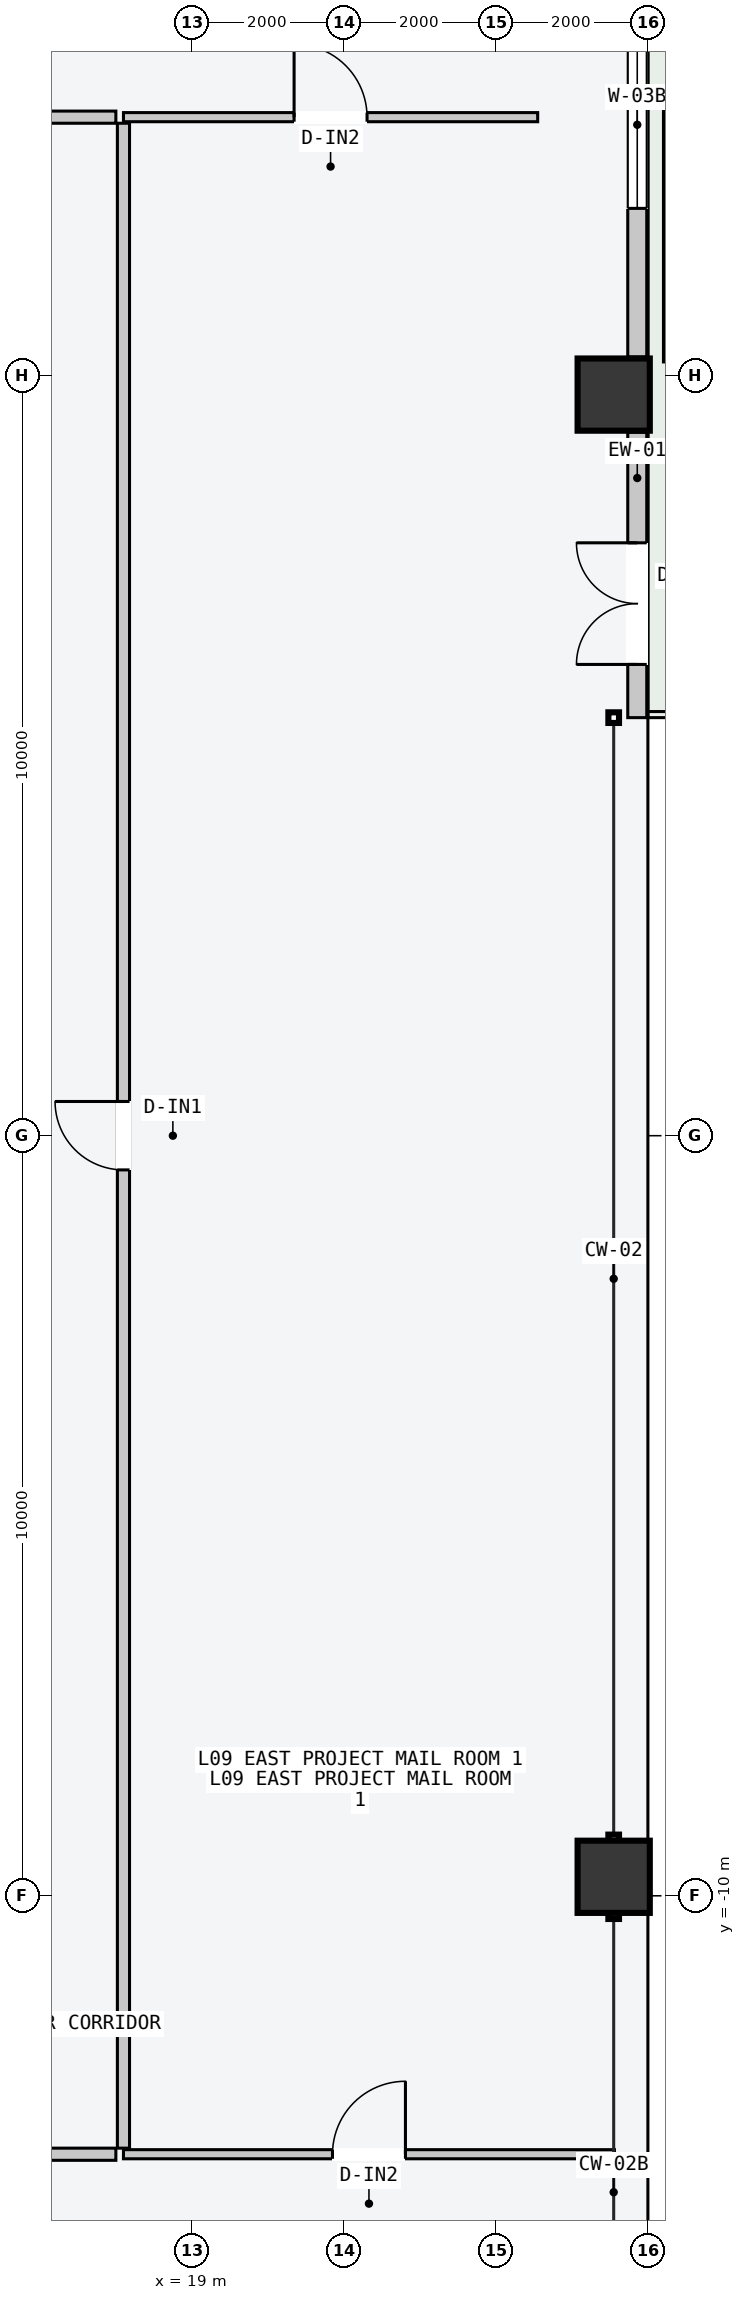
"""IFC4 building model, lengths in metres.
Left out: names, types, materials, properties, quantities, classifications, styles, units other than length and angle.
Written with IfcOpenShell. Run it as: python <this file> out.ifc"""

import sys

from ifc_helpers import new_model, si_unit, direction, frame, frame_2d, origin, origin_2d, place, context, subcontext, project, spatial, rectangle, hollow_rectangle, extrude, element, fill, save


model = new_model("IFC4")
c1 = context("Model", 3, precision=1e-05, world=origin(), true_north=direction((0.0, 1.0)))
c2 = subcontext(c1, "Body", "Model", "MODEL_VIEW")
j1 = project(units=[si_unit("LENGTHUNIT", "METRE"), si_unit("PLANEANGLEUNIT", "RADIAN")], contexts=[c1])
p1 = place(None, origin())
s1 = spatial("IfcSite", under=j1, at=p1, CompositionType="ELEMENT")
p2 = place(p1, origin())
s2 = spatial("IfcBuilding", under=s1, at=p2, CompositionType="ELEMENT")
p3 = place(p2, frame((0.0, 0.0, 38.4)))
s3 = spatial("IfcBuildingStorey", under=s2, at=p3, CompositionType="ELEMENT", Elevation=38.4)
for number, where, z_axis, x_axis in (
    (1, (24.55, -9.75, 0.0), (0.0, 0.0, 1.0), (0.0, 1.0, 0.0)),
    (2, (24.55, 9.75, 0.0), (0.0, 0.0, 1.0), (0.0, 1.0, 0.0)),
):
    element("IfcColumn", number, at=place(p3, frame(where, z_axis=z_axis, x_axis=x_axis)), inside=s3, PredefinedType="COLUMN", context=c2, shape_type="SweptSolid", body=[
        extrude(hollow_rectangle(XDim=0.95, YDim=0.95, WallThickness=0.048, at=origin_2d()), origin(), (0.0, 0.0, 1.0), 3.6),
    ])
p4 = place(p3, frame((24.86, 5.5, 0.0), z_axis=(0.0, 0.0, 1.0), x_axis=(0.0, 1.0, 0.0)))
e3 = element("IfcWall", 3, at=p4, inside=s3, PredefinedType="STANDARD", context=c2, shape_type="SweptSolid", body=[
    extrude(rectangle(XDim=3.755, YDim=0.25, at=frame_2d((1.877, 0.0))), origin(), (0.0, 0.0, 1.0), 3.4),
])
p5 = place(p4, frame((0.7, 0.0, 0.0)))
e4 = element("IfcOpeningElement", 4, at=p5, cuts=e3, PredefinedType="OPENING", context=c2, shape_type="SweptSolid", body=[
    extrude(rectangle(XDim=1.6, YDim=2.2, at=frame_2d((0.8, 1.1))), frame((0.0, 0.135, 0.0), z_axis=(0.0, -1.0, 0.0), x_axis=(1.0, 0.0, 0.0)), (0.0, 0.0, 1.0), 0.27),
])
p6 = place(p3, frame((24.86, 10.245, 0.0), z_axis=(0.0, 0.0, 1.0), x_axis=(0.0, 1.0, 0.0)))
e5 = element("IfcWall", 5, at=p6, inside=s3, PredefinedType="STANDARD", context=c2, shape_type="SweptSolid", body=[
    extrude(rectangle(XDim=7.31, YDim=0.25, at=frame_2d((3.655, 0.0))), origin(), (0.0, 0.0, 1.0), 3.4),
])
p7 = place(p6, frame((1.955, 0.0, 0.85)))
e6 = element("IfcOpeningElement", 6, at=p7, cuts=e5, PredefinedType="OPENING", context=c2, shape_type="SweptSolid", body=[
    extrude(rectangle(XDim=2.2, YDim=2.1, at=frame_2d((1.1, 1.05))), frame((0.0, 0.135, 0.0), z_axis=(0.0, -1.0, 0.0), x_axis=(1.0, 0.0, 0.0)), (0.0, 0.0, 1.0), 0.27),
])
p8 = place(p3, frame((-18.0, 13.4, 0.0), z_axis=(0.0, 0.0, 1.0), x_axis=(1.0, 0.0, 0.0)))
e7 = element("IfcWall", 7, at=p8, inside=s3, PredefinedType="PARTITIONING", context=c2, shape_type="SweptSolid", body=[
    extrude(rectangle(XDim=36.0, YDim=0.16, at=frame_2d((18.0, 0.0))), origin(), (0.0, 0.0, 1.0), 3.4),
])
p9 = place(p8, frame((7.105, 0.0, 0.0)))
e8 = element("IfcOpeningElement", 8, at=p9, cuts=e7, PredefinedType="OPENING", context=c2, shape_type="SweptSolid", body=[
    extrude(rectangle(XDim=1.4, YDim=2.2, at=frame_2d((0.7, 1.1))), frame((0.0, 0.09, 0.0), z_axis=(0.0, -1.0, 0.0), x_axis=(1.0, 0.0, 0.0)), (0.0, 0.0, 1.0), 0.18),
])
p10 = place(p8, frame((21.333, 0.0, 0.0)))
e9 = element("IfcOpeningElement", 9, at=p10, cuts=e7, PredefinedType="OPENING", context=c2, shape_type="SweptSolid", body=[
    extrude(rectangle(XDim=0.9, YDim=2.15, at=frame_2d((0.45, 1.075))), frame((0.0, 0.09, 0.0), z_axis=(0.0, -1.0, 0.0), x_axis=(1.0, 0.0, 0.0)), (0.0, 0.0, 1.0), 0.18),
])
p11 = place(p8, frame((31.498, 0.0, 0.0)))
e10 = element("IfcOpeningElement", 10, at=p11, cuts=e7, PredefinedType="OPENING", context=c2, shape_type="SweptSolid", body=[
    extrude(rectangle(XDim=0.96, YDim=2.18, at=frame_2d((0.48, 1.09))), frame((0.0, 0.09, 0.0), z_axis=(0.0, -1.0, 0.0), x_axis=(1.0, 0.0, 0.0)), (0.0, 0.0, 1.0), 0.18),
])
p12 = place(p3, frame((18.1, 13.4, 0.0), z_axis=(0.0, 0.0, 1.0), x_axis=(1.0, 0.0, 0.0)))
e11 = element("IfcWall", 11, at=p12, inside=s3, PredefinedType="PARTITIONING", context=c2, shape_type="SweptSolid", body=[
    extrude(rectangle(XDim=5.45, YDim=0.12, at=frame_2d((2.725, 0.0))), origin(), (0.0, 0.0, 1.0), 3.4),
])
p13 = place(p12, frame((2.245, 0.0, 0.0)))
e12 = element("IfcOpeningElement", 12, at=p13, cuts=e11, PredefinedType="OPENING", context=c2, shape_type="SweptSolid", body=[
    extrude(rectangle(XDim=0.96, YDim=2.18, at=frame_2d((0.48, 1.09))), frame((0.0, 0.07, 0.0), z_axis=(0.0, -1.0, 0.0), x_axis=(1.0, 0.0, 0.0)), (0.0, 0.0, 1.0), 0.14),
])
p14 = place(p3, frame((-18.0, -13.4, 0.0), z_axis=(0.0, 0.0, 1.0), x_axis=(1.0, 0.0, 0.0)))
e13 = element("IfcWall", 13, at=p14, inside=s3, PredefinedType="PARTITIONING", context=c2, shape_type="SweptSolid", body=[
    extrude(rectangle(XDim=36.0, YDim=0.16, at=frame_2d((18.0, 0.0))), origin(), (0.0, 0.0, 1.0), 3.4),
])
p15 = place(p14, frame((7.225, 0.0, 0.0)))
e14 = element("IfcOpeningElement", 14, at=p15, cuts=e13, PredefinedType="OPENING", context=c2, shape_type="SweptSolid", body=[
    extrude(rectangle(XDim=1.02, YDim=2.2, at=frame_2d((0.51, 1.1))), frame((0.0, 0.09, 0.0), z_axis=(0.0, -1.0, 0.0), x_axis=(1.0, 0.0, 0.0)), (0.0, 0.0, 1.0), 0.18),
])
p16 = place(p14, frame((25.205, 0.0, 0.0)))
e15 = element("IfcOpeningElement", 15, at=p16, cuts=e13, PredefinedType="OPENING", context=c2, shape_type="SweptSolid", body=[
    extrude(rectangle(XDim=1.06, YDim=2.2, at=frame_2d((0.53, 1.1))), frame((0.0, 0.09, 0.0), z_axis=(0.0, -1.0, 0.0), x_axis=(1.0, 0.0, 0.0)), (0.0, 0.0, 1.0), 0.18),
])
p17 = place(p3, frame((18.1, -13.4, 0.0), z_axis=(0.0, 0.0, 1.0), x_axis=(1.0, 0.0, 0.0)))
e16 = element("IfcWall", 16, at=p17, inside=s3, PredefinedType="PARTITIONING", context=c2, shape_type="SweptSolid", body=[
    extrude(rectangle(XDim=6.46, YDim=0.12, at=frame_2d((3.23, 0.0))), origin(), (0.0, 0.0, 1.0), 3.4),
])
p18 = place(p17, frame((2.75, 0.0, 0.0)))
e17 = element("IfcOpeningElement", 17, at=p18, cuts=e16, PredefinedType="OPENING", context=c2, shape_type="SweptSolid", body=[
    extrude(rectangle(XDim=0.96, YDim=2.18, at=frame_2d((0.48, 1.09))), frame((0.0, 0.07, 0.0), z_axis=(0.0, -1.0, 0.0), x_axis=(1.0, 0.0, 0.0)), (0.0, 0.0, 1.0), 0.14),
])
p19 = place(p3, frame((18.1, -13.32, 0.0), z_axis=(0.0, 0.0, 1.0), x_axis=(0.0, 1.0, 0.0)))
e18 = element("IfcWall", 18, at=p19, inside=s3, PredefinedType="PARTITIONING", context=c2, shape_type="SweptSolid", body=[
    extrude(rectangle(XDim=26.64, YDim=0.16, at=frame_2d((13.32, 0.0))), origin(), (0.0, 0.0, 1.0), 3.4),
])
p20 = place(p19, frame((12.87, 0.0, 0.0)))
e19 = element("IfcOpeningElement", 19, at=p20, cuts=e18, PredefinedType="OPENING", context=c2, shape_type="SweptSolid", body=[
    extrude(rectangle(XDim=0.9, YDim=2.15, at=frame_2d((0.45, 1.075))), frame((0.0, 0.09, 0.0), z_axis=(0.0, -1.0, 0.0), x_axis=(1.0, 0.0, 0.0)), (0.0, 0.0, 1.0), 0.18),
])
p21 = place(p5, origin())
e20 = element("IfcDoor", 20, at=p21, inside=s3, OperationType="DOUBLE_DOOR_SINGLE_SWING", PredefinedType="DOOR", context=c2, shape_type="SweptSolid", body=[
    extrude(rectangle(XDim=1.6, YDim=2.2, at=frame_2d((0.8, 1.1))), frame((0.0, 0.025, 0.0), z_axis=(0.0, -1.0, 0.0), x_axis=(1.0, 0.0, 0.0)), (0.0, 0.0, 1.0), 0.05),
])
fill(e4, e20)
p22 = place(p7, origin())
e21 = element("IfcWindow", 21, at=p22, inside=s3, PartitioningType="SINGLE_PANEL", PredefinedType="WINDOW", context=c2, shape_type="SweptSolid", body=[
    extrude(rectangle(XDim=2.2, YDim=2.1, at=frame_2d((1.1, 1.05))), frame((0.0, 0.03, 0.0), z_axis=(0.0, -1.0, 0.0), x_axis=(1.0, 0.0, 0.0)), (0.0, 0.0, 1.0), 0.06),
])
fill(e6, e21)
p23 = place(p13, origin())
e22 = element("IfcDoor", 22, at=p23, inside=s3, OperationType="SINGLE_SWING_LEFT", PredefinedType="DOOR", context=c2, shape_type="SweptSolid", body=[
    extrude(rectangle(XDim=0.96, YDim=2.18, at=frame_2d((0.48, 1.09))), frame((0.0, 0.025, 0.0), z_axis=(0.0, -1.0, 0.0), x_axis=(1.0, 0.0, 0.0)), (0.0, 0.0, 1.0), 0.05),
])
fill(e12, e22)
p24 = place(p18, origin())
e23 = element("IfcDoor", 23, at=p24, inside=s3, OperationType="SINGLE_SWING_RIGHT", PredefinedType="DOOR", context=c2, shape_type="SweptSolid", body=[
    extrude(rectangle(XDim=0.96, YDim=2.18, at=frame_2d((0.48, 1.09))), frame((0.0, 0.025, 0.0), z_axis=(0.0, -1.0, 0.0), x_axis=(1.0, 0.0, 0.0)), (0.0, 0.0, 1.0), 0.05),
])
fill(e17, e23)
p25 = place(p20, origin())
e24 = element("IfcDoor", 24, at=p25, inside=s3, OperationType="SINGLE_SWING_RIGHT", PredefinedType="DOOR", context=c2, shape_type="SweptSolid", body=[
    extrude(rectangle(XDim=0.9, YDim=2.15, at=frame_2d((0.45, 1.075))), frame((0.0, 0.025, 0.0), z_axis=(0.0, -1.0, 0.0), x_axis=(1.0, 0.0, 0.0)), (0.0, 0.0, 1.0), 0.05),
])
fill(e19, e24)
save(model, sys.argv[1])
